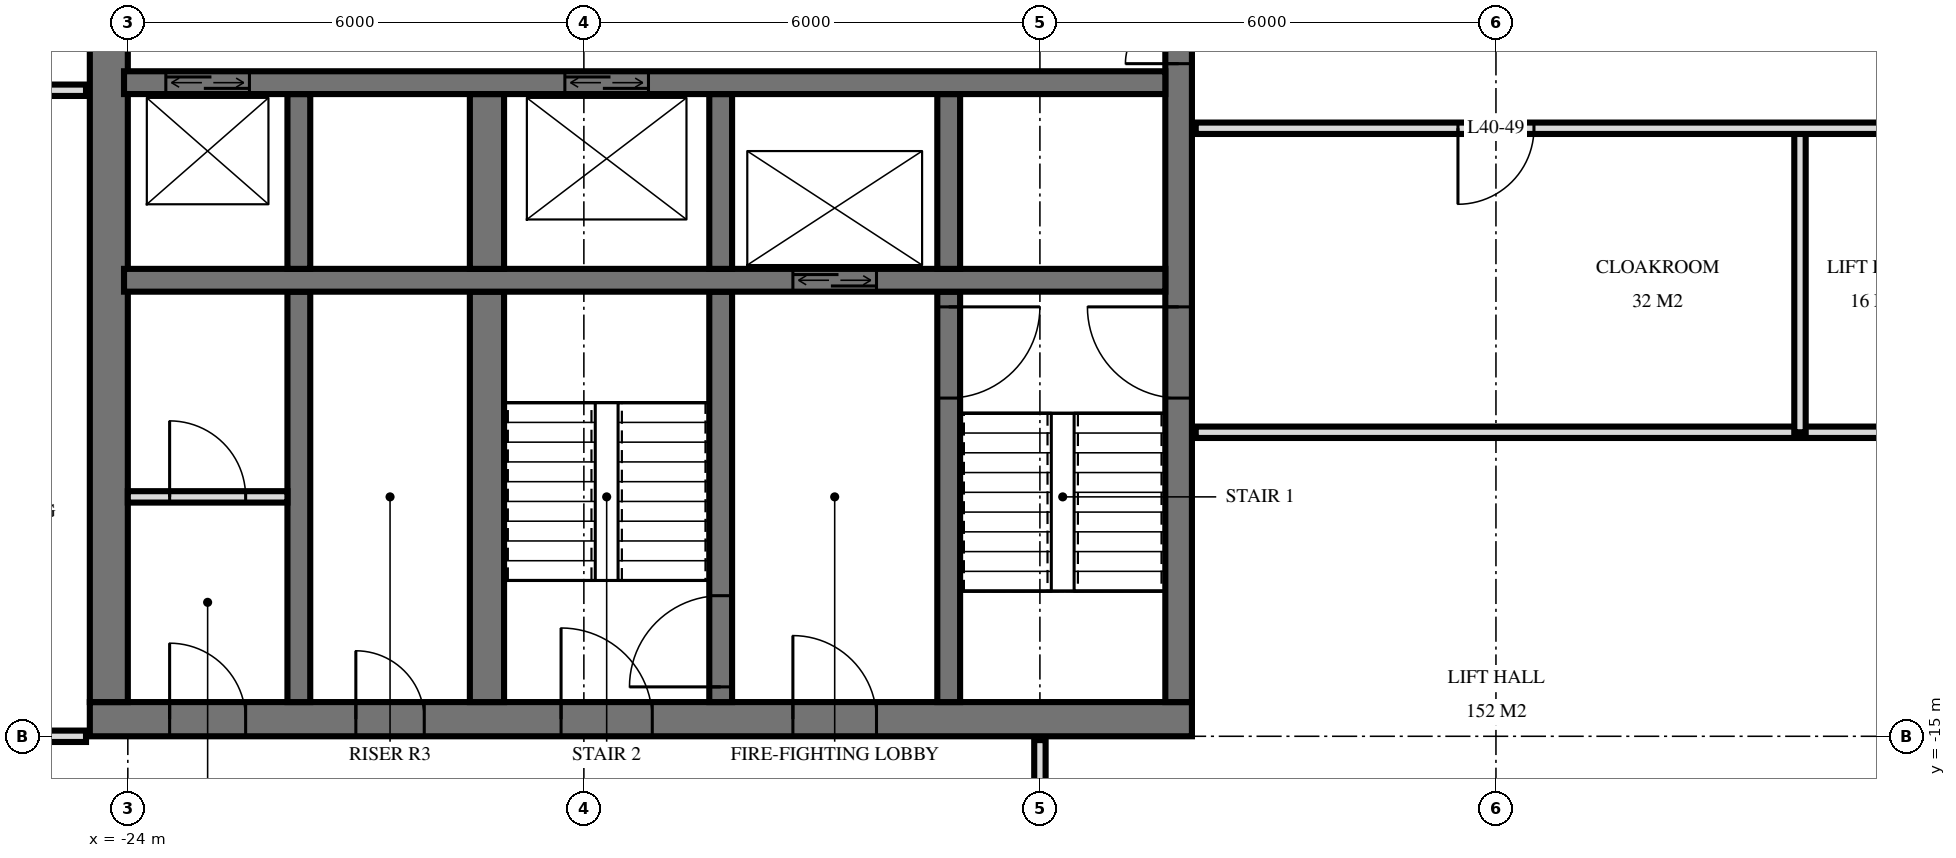
"""IFC4 building model, lengths in metres.
Left out: names, types, materials, properties, quantities, classifications, styles, units other than length and angle.
Written with IfcOpenShell. Run it as: python <this file> out.ifc"""

import sys

from ifc_helpers import new_model, si_unit, direction, frame, frame_2d, origin, place, context, subcontext, project, spatial, rectangle, extrude, element, fill, save


model = new_model("IFC4")
c1 = context("Model", 3, precision=1e-05, world=origin(), true_north=direction((0.0, 1.0)))
c2 = subcontext(c1, "Body", "Model", "MODEL_VIEW")
j1 = project(units=[si_unit("LENGTHUNIT", "METRE"), si_unit("PLANEANGLEUNIT", "RADIAN")], contexts=[c1])
p1 = place(None, origin())
s1 = spatial("IfcSite", under=j1, at=p1, CompositionType="ELEMENT")
p2 = place(p1, origin())
s2 = spatial("IfcBuilding", under=s1, at=p2, CompositionType="ELEMENT")
p3 = place(p2, frame((0.0, 0.0, 156.0)))
s3 = spatial("IfcBuildingStorey", under=s2, at=p3, CompositionType="ELEMENT", Elevation=156.0)
p4 = place(p3, frame((-24.5, -14.775, 0.0), z_axis=(0.0, 0.0, 1.0), x_axis=(1.0, 0.0, 0.0)))
e1 = element("IfcWall", 1, at=p4, inside=s3, PredefinedType="SHEAR", context=c2, shape_type="SweptSolid", body=[
    extrude(rectangle(XDim=14.5, YDim=0.45, at=frame_2d((7.25, 0.0))), origin(), (0.0, 0.0, 1.0), 3.6),
])
p5 = place(p4, frame((6.2, 0.0, 0.0)))
e2 = element("IfcOpeningElement", 2, at=p5, cuts=e1, PredefinedType="OPENING", context=c2, shape_type="SweptSolid", body=[
    extrude(rectangle(XDim=1.2, YDim=2.1, at=frame_2d((0.6, 1.05))), frame((0.0, 0.235, 0.0), z_axis=(0.0, -1.0, 0.0), x_axis=(1.0, 0.0, 0.0)), (0.0, 0.0, 1.0), 0.47),
])
p6 = place(p4, frame((9.25, 0.0, 0.0)))
e3 = element("IfcOpeningElement", 3, at=p6, cuts=e1, PredefinedType="OPENING", context=c2, shape_type="SweptSolid", body=[
    extrude(rectangle(XDim=1.1, YDim=2.1, at=frame_2d((0.55, 1.05))), frame((0.0, 0.235, 0.0), z_axis=(0.0, -1.0, 0.0), x_axis=(1.0, 0.0, 0.0)), (0.0, 0.0, 1.0), 0.47),
])
p7 = place(p4, frame((3.5, 0.0, 0.0)))
e4 = element("IfcOpeningElement", 4, at=p7, cuts=e1, PredefinedType="OPENING", context=c2, shape_type="SweptSolid", body=[
    extrude(rectangle(XDim=0.9, YDim=2.1, at=frame_2d((0.45, 1.05))), frame((0.0, 0.235, 0.0), z_axis=(0.0, -1.0, 0.0), x_axis=(1.0, 0.0, 0.0)), (0.0, 0.0, 1.0), 0.47),
])
p8 = place(p4, frame((1.05, 0.0, 0.0)))
e5 = element("IfcOpeningElement", 5, at=p8, cuts=e1, PredefinedType="OPENING", context=c2, shape_type="SweptSolid", body=[
    extrude(rectangle(XDim=1.0, YDim=2.1, at=frame_2d((0.5, 1.05))), frame((0.0, 0.235, 0.0), z_axis=(0.0, -1.0, 0.0), x_axis=(1.0, 0.0, 0.0)), (0.0, 0.0, 1.0), 0.47),
])
p9 = place(p3, frame((-10.175, -14.55, 0.0), z_axis=(0.0, 0.0, 1.0), x_axis=(0.0, 1.0, 0.0)))
e6 = element("IfcWall", 6, at=p9, inside=s3, PredefinedType="SHEAR", context=c2, shape_type="SweptSolid", body=[
    extrude(rectangle(XDim=14.1, YDim=0.35, at=frame_2d((7.05, 0.0))), origin(), (0.0, 0.0, 1.0), 3.6),
])
p10 = place(p9, frame((8.4, 0.0, 0.0)))
e7 = element("IfcOpeningElement", 7, at=p10, cuts=e6, PredefinedType="OPENING", context=c2, shape_type="SweptSolid", body=[
    extrude(rectangle(XDim=1.4, YDim=2.4, at=frame_2d((0.7, 1.2))), frame((0.0, 0.185, 0.0), z_axis=(0.0, -1.0, 0.0), x_axis=(1.0, 0.0, 0.0)), (0.0, 0.0, 1.0), 0.37),
])
p11 = place(p9, frame((10.0, 0.0, 0.0)))
e8 = element("IfcOpeningElement", 8, at=p11, cuts=e6, PredefinedType="OPENING", context=c2, shape_type="SweptSolid", body=[
    extrude(rectangle(XDim=1.4, YDim=2.4, at=frame_2d((0.7, 1.2))), frame((0.0, 0.185, 0.0), z_axis=(0.0, -1.0, 0.0), x_axis=(1.0, 0.0, 0.0)), (0.0, 0.0, 1.0), 0.37),
])
p12 = place(p9, frame((4.0, 0.0, 0.0)))
e9 = element("IfcOpeningElement", 9, at=p12, cuts=e6, PredefinedType="OPENING", context=c2, shape_type="SweptSolid", body=[
    extrude(rectangle(XDim=1.2, YDim=2.1, at=frame_2d((0.6, 1.05))), frame((0.0, 0.185, 0.0), z_axis=(0.0, -1.0, 0.0), x_axis=(1.0, 0.0, 0.0)), (0.0, 0.0, 1.0), 0.37),
])
p13 = place(p3, frame((-24.25, -14.55, 0.0), z_axis=(0.0, 0.0, 1.0), x_axis=(0.0, 1.0, 0.0)))
e10 = element("IfcWall", 10, at=p13, inside=s3, PredefinedType="SHEAR", context=c2, shape_type="SweptSolid", body=[
    extrude(rectangle(XDim=14.1, YDim=0.5, at=frame_2d((7.05, 0.0))), origin(), (0.0, 0.0, 1.0), 3.6),
])
p14 = place(p3, frame((-24.05, -6.4, 0.0), z_axis=(0.0, 0.0, 1.0), x_axis=(1.0, 0.0, 0.0)))
e11 = element("IfcWall", 11, at=p14, inside=s3, PredefinedType="SHEAR", context=c2, shape_type="SweptSolid", body=[
    extrude(rectangle(XDim=13.7, YDim=0.3, at=frame_2d((6.85, 0.0))), origin(), (0.0, 0.0, 1.0), 3.6),
])
p15 = place(p14, frame((0.55, 0.0, 0.0)))
e12 = element("IfcOpeningElement", 12, at=p15, cuts=e11, PredefinedType="OPENING", context=c2, shape_type="SweptSolid", body=[
    extrude(rectangle(XDim=1.1, YDim=2.1, at=frame_2d((0.55, 1.05))), frame((0.0, 0.16, 0.0), z_axis=(0.0, -1.0, 0.0), x_axis=(1.0, 0.0, 0.0)), (0.0, 0.0, 1.0), 0.32),
])
p16 = place(p14, frame((5.8, 0.0, 0.0)))
e13 = element("IfcOpeningElement", 13, at=p16, cuts=e11, PredefinedType="OPENING", context=c2, shape_type="SweptSolid", body=[
    extrude(rectangle(XDim=1.1, YDim=2.1, at=frame_2d((0.55, 1.05))), frame((0.0, 0.16, 0.0), z_axis=(0.0, -1.0, 0.0), x_axis=(1.0, 0.0, 0.0)), (0.0, 0.0, 1.0), 0.32),
])
p17 = place(p3, frame((-24.05, -9.0, 0.0), z_axis=(0.0, 0.0, 1.0), x_axis=(1.0, 0.0, 0.0)))
e14 = element("IfcWall", 14, at=p17, inside=s3, PredefinedType="SHEAR", context=c2, shape_type="SweptSolid", body=[
    extrude(rectangle(XDim=13.7, YDim=0.3, at=frame_2d((6.85, 0.0))), origin(), (0.0, 0.0, 1.0), 3.6),
])
p18 = place(p17, frame((8.8, 0.0, 0.0)))
e15 = element("IfcOpeningElement", 15, at=p18, cuts=e14, PredefinedType="OPENING", context=c2, shape_type="SweptSolid", body=[
    extrude(rectangle(XDim=1.1, YDim=2.1, at=frame_2d((0.55, 1.05))), frame((0.0, 0.16, 0.0), z_axis=(0.0, -1.0, 0.0), x_axis=(1.0, 0.0, 0.0)), (0.0, 0.0, 1.0), 0.32),
])
p19 = place(p3, frame((-13.2, -8.85, 0.0), z_axis=(0.0, 0.0, 1.0), x_axis=(0.0, 1.0, 0.0)))
e16 = element("IfcWall", 16, at=p19, inside=s3, PredefinedType="SHEAR", context=c2, shape_type="SweptSolid", body=[
    extrude(rectangle(XDim=2.3, YDim=0.3, at=frame_2d((1.15, 0.0))), origin(), (0.0, 0.0, 1.0), 3.6),
])
p20 = place(p3, frame((-13.2, -14.55, 0.0), z_axis=(0.0, 0.0, 1.0), x_axis=(0.0, 1.0, 0.0)))
e17 = element("IfcWall", 17, at=p20, inside=s3, PredefinedType="SHEAR", context=c2, shape_type="SweptSolid", body=[
    extrude(rectangle(XDim=5.4, YDim=0.3, at=frame_2d((2.7, 0.0))), origin(), (0.0, 0.0, 1.0), 3.6),
])
p21 = place(p20, frame((4.0, 0.0, 0.0)))
e18 = element("IfcOpeningElement", 18, at=p21, cuts=e17, PredefinedType="OPENING", context=c2, shape_type="SweptSolid", body=[
    extrude(rectangle(XDim=1.2, YDim=2.1, at=frame_2d((0.6, 1.05))), frame((0.0, 0.16, 0.0), z_axis=(0.0, -1.0, 0.0), x_axis=(1.0, 0.0, 0.0)), (0.0, 0.0, 1.0), 0.32),
])
p22 = place(p3, frame((-16.2, -8.85, 0.0), z_axis=(0.0, 0.0, 1.0), x_axis=(0.0, 1.0, 0.0)))
e19 = element("IfcWall", 19, at=p22, inside=s3, PredefinedType="SHEAR", context=c2, shape_type="SweptSolid", body=[
    extrude(rectangle(XDim=2.3, YDim=0.3, at=frame_2d((1.15, 0.0))), origin(), (0.0, 0.0, 1.0), 3.6),
])
p23 = place(p3, frame((-16.2, -14.55, 0.0), z_axis=(0.0, 0.0, 1.0), x_axis=(0.0, 1.0, 0.0)))
e20 = element("IfcWall", 20, at=p23, inside=s3, PredefinedType="SHEAR", context=c2, shape_type="SweptSolid", body=[
    extrude(rectangle(XDim=5.4, YDim=0.3, at=frame_2d((2.7, 0.0))), origin(), (0.0, 0.0, 1.0), 3.6),
])
p24 = place(p23, frame((0.2, 0.0, 0.0)))
e21 = element("IfcOpeningElement", 21, at=p24, cuts=e20, PredefinedType="OPENING", context=c2, shape_type="SweptSolid", body=[
    extrude(rectangle(XDim=1.2, YDim=2.1, at=frame_2d((0.6, 1.05))), frame((0.0, 0.16, 0.0), z_axis=(0.0, -1.0, 0.0), x_axis=(1.0, 0.0, 0.0)), (0.0, 0.0, 1.0), 0.32),
])
p25 = place(p3, frame((-19.275, -8.85, 0.0), z_axis=(0.0, 0.0, 1.0), x_axis=(0.0, 1.0, 0.0)))
e22 = element("IfcWall", 22, at=p25, inside=s3, PredefinedType="SHEAR", context=c2, shape_type="SweptSolid", body=[
    extrude(rectangle(XDim=2.3, YDim=0.45, at=frame_2d((1.15, 0.0))), origin(), (0.0, 0.0, 1.0), 3.6),
])
p26 = place(p3, frame((-19.275, -14.55, 0.0), z_axis=(0.0, 0.0, 1.0), x_axis=(0.0, 1.0, 0.0)))
e23 = element("IfcWall", 23, at=p26, inside=s3, PredefinedType="SHEAR", context=c2, shape_type="SweptSolid", body=[
    extrude(rectangle(XDim=5.4, YDim=0.45, at=frame_2d((2.7, 0.0))), origin(), (0.0, 0.0, 1.0), 3.6),
])
p27 = place(p3, frame((-21.75, -8.85, 0.0), z_axis=(0.0, 0.0, 1.0), x_axis=(0.0, 1.0, 0.0)))
e24 = element("IfcWall", 24, at=p27, inside=s3, PredefinedType="SHEAR", context=c2, shape_type="SweptSolid", body=[
    extrude(rectangle(XDim=2.3, YDim=0.3, at=frame_2d((1.15, 0.0))), origin(), (0.0, 0.0, 1.0), 3.6),
])
p28 = place(p3, frame((-21.75, -14.55, 0.0), z_axis=(0.0, 0.0, 1.0), x_axis=(0.0, 1.0, 0.0)))
e25 = element("IfcWall", 25, at=p28, inside=s3, PredefinedType="SHEAR", context=c2, shape_type="SweptSolid", body=[
    extrude(rectangle(XDim=5.4, YDim=0.3, at=frame_2d((2.7, 0.0))), origin(), (0.0, 0.0, 1.0), 3.6),
])
p29 = place(p3, frame((-24.0, -11.85, 0.0), z_axis=(0.0, 0.0, 1.0), x_axis=(1.0, 0.0, 0.0)))
e26 = element("IfcWall", 26, at=p29, inside=s3, PredefinedType="PARTITIONING", context=c2, shape_type="SweptSolid", body=[
    extrude(rectangle(XDim=2.1, YDim=0.15, at=frame_2d((1.05, 0.0))), origin(), (0.0, 0.0, 1.0), 3.3),
])
p30 = place(p29, frame((0.55, 0.0, 0.0)))
e27 = element("IfcOpeningElement", 27, at=p30, cuts=e26, PredefinedType="OPENING", context=c2, shape_type="SweptSolid", body=[
    extrude(rectangle(XDim=1.0, YDim=2.1, at=frame_2d((0.5, 1.05))), frame((0.0, 0.085, 0.0), z_axis=(0.0, -1.0, 0.0), x_axis=(1.0, 0.0, 0.0)), (0.0, 0.0, 1.0), 0.17),
])
p31 = place(p3, frame((-2.0, -11.0, 0.0), z_axis=(0.0, 0.0, 1.0), x_axis=(0.0, 1.0, 0.0)))
e28 = element("IfcWall", 28, at=p31, inside=s3, PredefinedType="PARTITIONING", context=c2, shape_type="SweptSolid", body=[
    extrude(rectangle(XDim=4.0, YDim=0.15, at=frame_2d((2.0, 0.0))), origin(), (0.0, 0.0, 1.0), 3.32),
])
p32 = place(p3, frame((-12.0, -18.0, 0.0), z_axis=(0.0, 0.0, 1.0), x_axis=(0.0, 1.0, 0.0)))
e29 = element("IfcWall", 29, at=p32, inside=s3, PredefinedType="PARTITIONING", context=c2, shape_type="SweptSolid", body=[
    extrude(rectangle(XDim=2.95, YDim=0.15, at=frame_2d((1.475, 0.0))), origin(), (0.0, 0.0, 1.0), 3.32),
])
p33 = place(p32, frame((1.0, 0.0, 0.0)))
e30 = element("IfcOpeningElement", 30, at=p33, cuts=e29, PredefinedType="OPENING", context=c2, shape_type="SweptSolid", body=[
    extrude(rectangle(XDim=1.0, YDim=2.1, at=frame_2d((0.5, 1.05))), frame((0.0, 0.085, 0.0), z_axis=(0.0, -1.0, 0.0), x_axis=(1.0, 0.0, 0.0)), (0.0, 0.0, 1.0), 0.17),
])
p34 = place(p3, frame((-28.02, -15.0, 0.0), z_axis=(0.0, 0.0, 1.0), x_axis=(1.0, 0.0, 0.0)))
e31 = element("IfcWall", 31, at=p34, inside=s3, PredefinedType="PARTITIONING", context=c2, shape_type="SweptSolid", body=[
    extrude(rectangle(XDim=3.47, YDim=0.15, at=frame_2d((1.735, 0.0))), origin(), (0.0, 0.0, 1.0), 3.32),
])
p35 = place(p34, frame((1.57, 0.0, 0.0)))
e32 = element("IfcOpeningElement", 32, at=p35, cuts=e31, PredefinedType="OPENING", context=c2, shape_type="SweptSolid", body=[
    extrude(rectangle(XDim=1.0, YDim=2.1, at=frame_2d((0.5, 1.05))), frame((0.0, 0.085, 0.0), z_axis=(0.0, -1.0, 0.0), x_axis=(1.0, 0.0, 0.0)), (0.0, 0.0, 1.0), 0.17),
])
p36 = place(p3, frame((-9.95, -11.0, 0.0), z_axis=(0.0, 0.0, 1.0), x_axis=(1.0, 0.0, 0.0)))
e33 = element("IfcWall", 33, at=p36, inside=s3, PredefinedType="PARTITIONING", context=c2, shape_type="SweptSolid", body=[
    extrude(rectangle(XDim=19.9, YDim=0.15, at=frame_2d((9.95, 0.0))), origin(), (0.0, 0.0, 1.0), 3.32),
])
p37 = place(p36, frame((9.45, 0.0, 0.0)))
e34 = element("IfcOpeningElement", 34, at=p37, cuts=e33, PredefinedType="OPENING", context=c2, shape_type="SweptSolid", body=[
    extrude(rectangle(XDim=1.0, YDim=2.1, at=frame_2d((0.5, 1.05))), frame((0.0, 0.085, 0.0), z_axis=(0.0, -1.0, 0.0), x_axis=(1.0, 0.0, 0.0)), (0.0, 0.0, 1.0), 0.17),
])
p38 = place(p36, frame((15.45, 0.0, 0.0)))
e35 = element("IfcOpeningElement", 35, at=p38, cuts=e33, PredefinedType="OPENING", context=c2, shape_type="SweptSolid", body=[
    extrude(rectangle(XDim=1.0, YDim=2.1, at=frame_2d((0.5, 1.05))), frame((0.0, 0.085, 0.0), z_axis=(0.0, -1.0, 0.0), x_axis=(1.0, 0.0, 0.0)), (0.0, 0.0, 1.0), 0.17),
])
p39 = place(p3, frame((-9.95, -7.0, 0.0), z_axis=(0.0, 0.0, 1.0), x_axis=(1.0, 0.0, 0.0)))
e36 = element("IfcWall", 36, at=p39, inside=s3, PredefinedType="PARTITIONING", context=c2, shape_type="SweptSolid", body=[
    extrude(rectangle(XDim=19.9, YDim=0.15, at=frame_2d((9.95, 0.0))), origin(), (0.0, 0.0, 1.0), 3.32),
])
p40 = place(p39, frame((9.45, 0.0, 0.0)))
e37 = element("IfcOpeningElement", 37, at=p40, cuts=e36, PredefinedType="OPENING", context=c2, shape_type="SweptSolid", body=[
    extrude(rectangle(XDim=1.0, YDim=2.1, at=frame_2d((0.5, 1.05))), frame((0.0, 0.085, 0.0), z_axis=(0.0, -1.0, 0.0), x_axis=(1.0, 0.0, 0.0)), (0.0, 0.0, 1.0), 0.17),
])
p41 = place(p39, frame((3.45, 0.0, 0.0)))
e38 = element("IfcOpeningElement", 38, at=p41, cuts=e36, PredefinedType="OPENING", context=c2, shape_type="SweptSolid", body=[
    extrude(rectangle(XDim=1.0, YDim=2.1, at=frame_2d((0.5, 1.05))), frame((0.0, 0.085, 0.0), z_axis=(0.0, -1.0, 0.0), x_axis=(1.0, 0.0, 0.0)), (0.0, 0.0, 1.0), 0.17),
])
p42 = place(p3, frame((-28.02, -6.5, 0.0), z_axis=(0.0, 0.0, 1.0), x_axis=(1.0, 0.0, 0.0)))
e39 = element("IfcWall", 39, at=p42, inside=s3, PredefinedType="PARTITIONING", context=c2, shape_type="SweptSolid", body=[
    extrude(rectangle(XDim=3.47, YDim=0.15, at=frame_2d((1.735, 0.0))), origin(), (0.0, 0.0, 1.0), 3.32),
])
p43 = place(p42, frame((1.22, 0.0, 0.0)))
e40 = element("IfcOpeningElement", 40, at=p43, cuts=e39, PredefinedType="OPENING", context=c2, shape_type="SweptSolid", body=[
    extrude(rectangle(XDim=0.9, YDim=2.1, at=frame_2d((0.45, 1.05))), frame((0.0, 0.085, 0.0), z_axis=(0.0, -1.0, 0.0), x_axis=(1.0, 0.0, 0.0)), (0.0, 0.0, 1.0), 0.17),
])
p44 = place(p15, origin())
e41 = element("IfcDoor", 41, at=p44, inside=s3, OperationType="DOUBLE_DOOR_SLIDING", PredefinedType="USERDEFINED", context=c2, shape_type="SweptSolid", body=[
    extrude(rectangle(XDim=1.1, YDim=2.1, at=frame_2d((0.55, 1.05))), frame((0.0, 0.025, 0.0), z_axis=(0.0, -1.0, 0.0), x_axis=(1.0, 0.0, 0.0)), (0.0, 0.0, 1.0), 0.05),
])
fill(e12, e41)
p45 = place(p18, origin())
e42 = element("IfcDoor", 42, at=p45, inside=s3, OperationType="DOUBLE_DOOR_SLIDING", PredefinedType="USERDEFINED", context=c2, shape_type="SweptSolid", body=[
    extrude(rectangle(XDim=1.1, YDim=2.1, at=frame_2d((0.55, 1.05))), frame((0.0, 0.025, 0.0), z_axis=(0.0, -1.0, 0.0), x_axis=(1.0, 0.0, 0.0)), (0.0, 0.0, 1.0), 0.05),
])
fill(e15, e42)
p46 = place(p16, origin())
e43 = element("IfcDoor", 43, at=p46, inside=s3, OperationType="DOUBLE_DOOR_SLIDING", PredefinedType="USERDEFINED", context=c2, shape_type="SweptSolid", body=[
    extrude(rectangle(XDim=1.1, YDim=2.1, at=frame_2d((0.55, 1.05))), frame((0.0, 0.025, 0.0), z_axis=(0.0, -1.0, 0.0), x_axis=(1.0, 0.0, 0.0)), (0.0, 0.0, 1.0), 0.05),
])
fill(e13, e43)
p47 = place(p10, origin())
e44 = element("IfcDoor", 44, at=p47, inside=s3, OperationType="DOUBLE_DOOR_SINGLE_SWING", PredefinedType="DOOR", context=c2, shape_type="SweptSolid", body=[
    extrude(rectangle(XDim=1.4, YDim=2.4, at=frame_2d((0.7, 1.2))), frame((0.0, 0.025, 0.0), z_axis=(0.0, -1.0, 0.0), x_axis=(1.0, 0.0, 0.0)), (0.0, 0.0, 1.0), 0.05),
])
fill(e7, e44)
p48 = place(p12, origin())
e45 = element("IfcDoor", 45, at=p48, inside=s3, OperationType="SINGLE_SWING_LEFT", PredefinedType="DOOR", context=c2, shape_type="SweptSolid", body=[
    extrude(rectangle(XDim=1.2, YDim=2.1, at=frame_2d((0.6, 1.05))), frame((0.0, 0.025, 0.0), z_axis=(0.0, -1.0, 0.0), x_axis=(1.0, 0.0, 0.0)), (0.0, 0.0, 1.0), 0.05),
])
fill(e9, e45)
p49 = place(p5, origin())
e46 = element("IfcDoor", 46, at=p49, inside=s3, OperationType="SINGLE_SWING_RIGHT", PredefinedType="DOOR", context=c2, shape_type="SweptSolid", body=[
    extrude(rectangle(XDim=1.2, YDim=2.1, at=frame_2d((0.6, 1.05))), frame((0.0, 0.025, 0.0), z_axis=(0.0, -1.0, 0.0), x_axis=(1.0, 0.0, 0.0)), (0.0, 0.0, 1.0), 0.05),
])
fill(e2, e46)
p50 = place(p6, origin())
e47 = element("IfcDoor", 47, at=p50, inside=s3, OperationType="SINGLE_SWING_RIGHT", PredefinedType="DOOR", context=c2, shape_type="SweptSolid", body=[
    extrude(rectangle(XDim=1.1, YDim=2.1, at=frame_2d((0.55, 1.05))), frame((0.0, 0.025, 0.0), z_axis=(0.0, -1.0, 0.0), x_axis=(1.0, 0.0, 0.0)), (0.0, 0.0, 1.0), 0.05),
])
fill(e3, e47)
p51 = place(p7, origin())
e48 = element("IfcDoor", 48, at=p51, inside=s3, OperationType="SINGLE_SWING_RIGHT", PredefinedType="DOOR", context=c2, shape_type="SweptSolid", body=[
    extrude(rectangle(XDim=0.9, YDim=2.1, at=frame_2d((0.45, 1.05))), frame((0.0, 0.025, 0.0), z_axis=(0.0, -1.0, 0.0), x_axis=(1.0, 0.0, 0.0)), (0.0, 0.0, 1.0), 0.05),
])
fill(e4, e48)
p52 = place(p8, origin())
e49 = element("IfcDoor", 49, at=p52, inside=s3, OperationType="SINGLE_SWING_RIGHT", PredefinedType="DOOR", context=c2, shape_type="SweptSolid", body=[
    extrude(rectangle(XDim=1.0, YDim=2.1, at=frame_2d((0.5, 1.05))), frame((0.0, 0.025, 0.0), z_axis=(0.0, -1.0, 0.0), x_axis=(1.0, 0.0, 0.0)), (0.0, 0.0, 1.0), 0.05),
])
fill(e5, e49)
p53 = place(p21, frame((0.6, 0.0, 0.0), z_axis=(0.0, 0.0, 1.0), x_axis=(-1.0, 0.0, 0.0)))
e50 = element("IfcDoor", 50, at=p53, inside=s3, OperationType="SINGLE_SWING_RIGHT", PredefinedType="DOOR", context=c2, shape_type="SweptSolid", body=[
    extrude(rectangle(XDim=1.2, YDim=2.1, at=frame_2d((0.0, 1.05))), frame((0.0, -0.025, 0.0), z_axis=(0.0, 1.0, 0.0), x_axis=(-1.0, 0.0, 0.0)), (0.0, 0.0, 1.0), 0.05),
])
fill(e18, e50)
p54 = place(p24, origin())
e51 = element("IfcDoor", 51, at=p54, inside=s3, OperationType="SINGLE_SWING_RIGHT", PredefinedType="DOOR", context=c2, shape_type="SweptSolid", body=[
    extrude(rectangle(XDim=1.2, YDim=2.1, at=frame_2d((0.6, 1.05))), frame((0.0, 0.025, 0.0), z_axis=(0.0, -1.0, 0.0), x_axis=(1.0, 0.0, 0.0)), (0.0, 0.0, 1.0), 0.05),
])
fill(e21, e51)
p55 = place(p30, origin())
e52 = element("IfcDoor", 52, at=p55, inside=s3, OperationType="SINGLE_SWING_RIGHT", PredefinedType="DOOR", context=c2, shape_type="SweptSolid", body=[
    extrude(rectangle(XDim=1.0, YDim=2.1, at=frame_2d((0.5, 1.05))), frame((0.0, 0.025, 0.0), z_axis=(0.0, -1.0, 0.0), x_axis=(1.0, 0.0, 0.0)), (0.0, 0.0, 1.0), 0.05),
])
fill(e27, e52)
p56 = place(p41, frame((0.5, 0.0, 0.0), z_axis=(0.0, 0.0, 1.0), x_axis=(-1.0, 0.0, 0.0)))
e53 = element("IfcDoor", 53, at=p56, inside=s3, OperationType="SINGLE_SWING_LEFT", PredefinedType="DOOR", context=c2, shape_type="SweptSolid", body=[
    extrude(rectangle(XDim=1.0, YDim=2.1, at=frame_2d((0.0, 1.05))), frame((0.0, -0.025, 0.0), z_axis=(0.0, 1.0, 0.0), x_axis=(-1.0, 0.0, 0.0)), (0.0, 0.0, 1.0), 0.05),
])
fill(e38, e53)
save(model, sys.argv[1])
